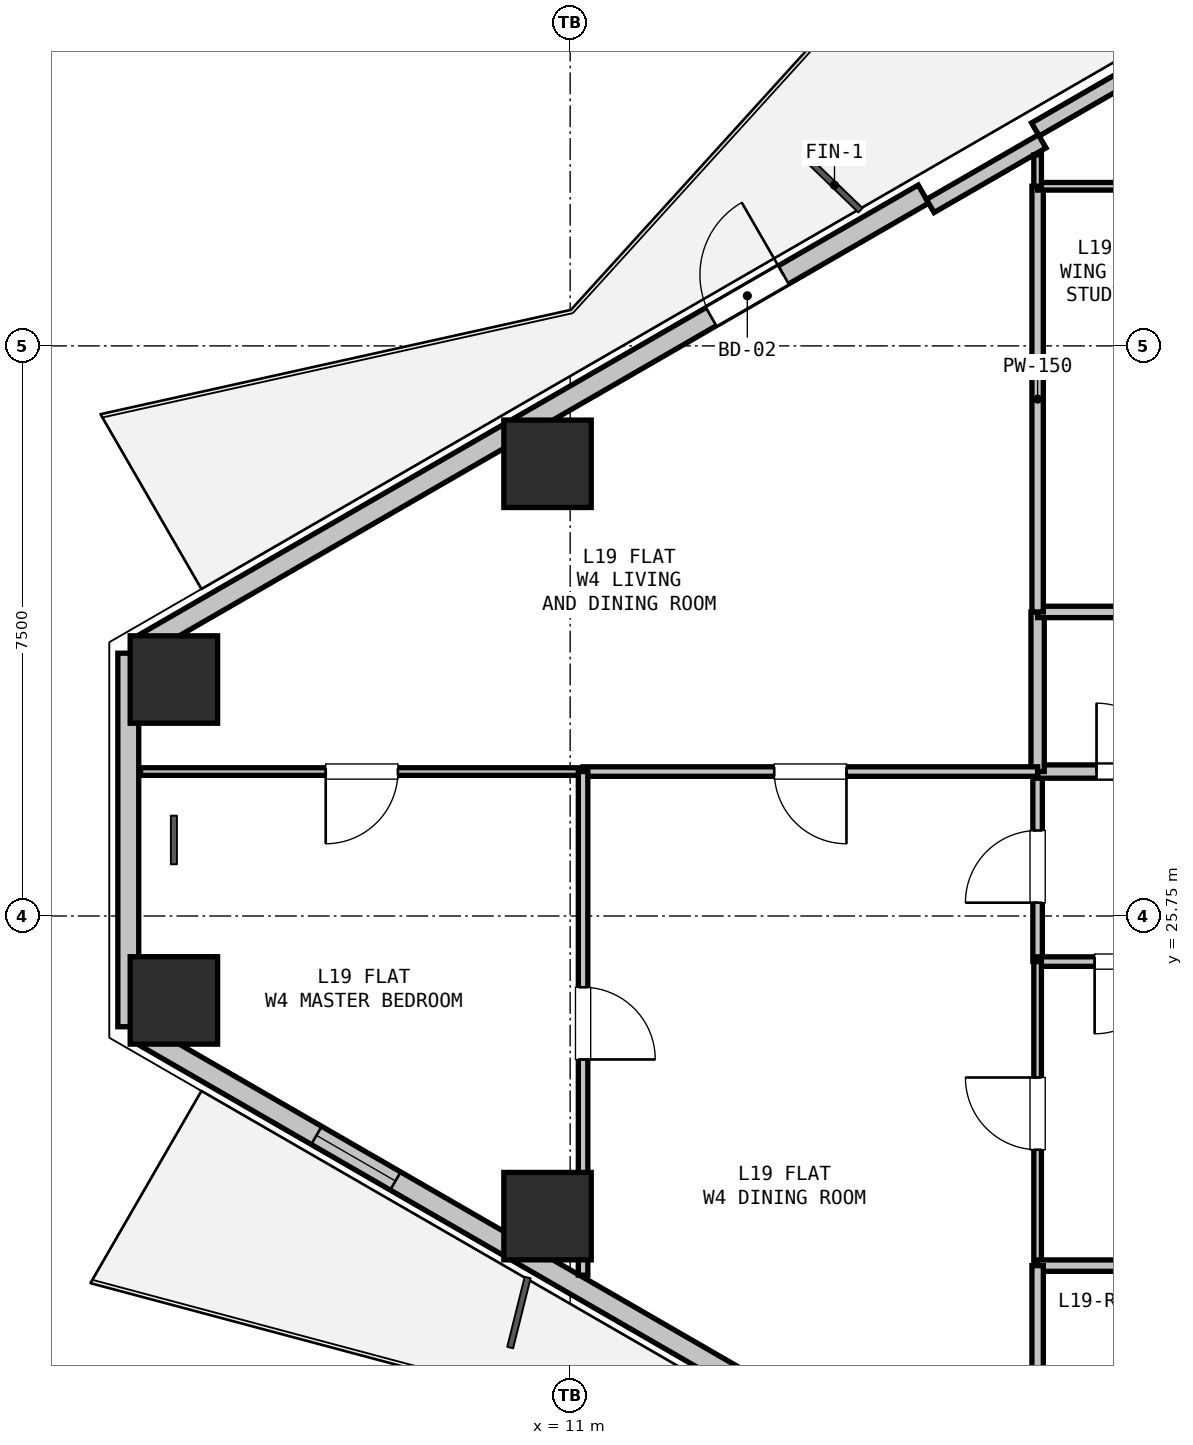
"""IFC4 building model, lengths in metres.
Left out: names, types, materials, properties, quantities, classifications, styles, units other than length and angle.
Written with IfcOpenShell. Run it as: python <this file> out.ifc"""

import sys

from ifc_helpers import new_model, si_unit, direction, frame, frame_2d, origin, origin_2d, place, context, subcontext, project, spatial, rectangle, hollow_rectangle, extrude, element, fill, save


model = new_model("IFC4")
c1 = context("Model", 3, precision=1e-05, world=origin(), true_north=direction((0.0, 1.0)))
c2 = subcontext(c1, "Body", "Model", "MODEL_VIEW")
j1 = project(units=[si_unit("LENGTHUNIT", "METRE"), si_unit("PLANEANGLEUNIT", "RADIAN")], contexts=[c1])
p1 = place(None, origin())
s1 = spatial("IfcSite", under=j1, at=p1, CompositionType="ELEMENT")
p2 = place(p1, origin())
s2 = spatial("IfcBuilding", under=s1, at=p2, CompositionType="ELEMENT")
p3 = place(p2, frame((0.0, 0.0, 73.5)))
s3 = spatial("IfcBuildingStorey", under=s2, at=p3, CompositionType="ELEMENT", Elevation=73.5)
for number, where, z_axis, x_axis in (
    (1, (5.787, 28.861, 0.0), (0.0, 0.0, 1.0), (1.0, 0.0, 0.0)),
    (2, (10.702, 31.699, 0.0), (0.0, 0.0, 1.0), (1.0, 0.0, 0.0)),
    (3, (10.702, 21.801, 0.0), (0.0, 0.0, 1.0), (1.0, 0.0, 0.0)),
    (4, (5.787, 24.639, 0.0), (0.0, 0.0, 1.0), (1.0, 0.0, 0.0)),
):
    element("IfcColumn", number, at=place(p3, frame(where, z_axis=z_axis, x_axis=x_axis)), inside=s3, PredefinedType="COLUMN", context=c2, shape_type="SweptSolid", body=[
        extrude(hollow_rectangle(XDim=1.15, YDim=1.15, WallThickness=0.032, at=origin_2d()), origin(), (0.0, 0.0, 1.0), 3.3),
    ])
p4 = place(p3, frame((5.187, 24.293, 0.0), z_axis=(0.0, 0.0, 1.0), x_axis=(0.0, 1.0, 0.0)))
e5 = element("IfcWall", 5, at=p4, inside=s3, PredefinedType="SOLIDWALL", context=c2, shape_type="SweptSolid", body=[
    extrude(rectangle(XDim=4.915, YDim=0.275, at=frame_2d((2.457, 0.0))), origin(), (0.0, 0.0, 1.0), 2.67),
])
p5 = place(p3, frame((5.317, 29.282, 0.0), z_axis=(0.0, 0.0, 1.0), x_axis=(0.866023023012, 0.500004123596, 0.0)))
e6 = element("IfcWall", 6, at=p5, inside=s3, PredefinedType="SOLIDWALL", context=c2, shape_type="SweptSolid", body=[
    extrude(rectangle(XDim=11.93, YDim=0.275, at=frame_2d((5.965, 0.0))), origin(), (0.0, 0.0, 1.0), 2.67),
])
p6 = place(p5, frame((8.704, 0.0, 0.0)))
e7 = element("IfcOpeningElement", 7, at=p6, cuts=e6, PredefinedType="OPENING", context=c2, shape_type="SweptSolid", body=[
    extrude(rectangle(XDim=1.1, YDim=2.1, at=frame_2d((0.55, 1.05))), frame((0.0, 0.147, 0.0), z_axis=(0.0, -1.0, 0.0), x_axis=(1.0, 0.0, 0.0)), (0.0, 0.0, 1.0), 0.295),
])
p7 = place(p3, frame((17.12, 36.097, 0.0), z_axis=(0.0, 0.0, 1.0), x_axis=(0.866027010039, 0.499997217876, 0.0)))
e8 = element("IfcWall", 8, at=p7, inside=s3, PredefinedType="PARAPET", context=c2, shape_type="SweptSolid", body=[
    extrude(rectangle(XDim=11.229, YDim=0.2, at=frame_2d((5.615, 0.0))), origin(), (0.0, 0.0, 1.0), 0.2),
])
p8 = place(p3, frame((15.738, 35.091, 0.0), z_axis=(0.0, 0.0, 1.0), x_axis=(0.866025371046, 0.500000056704, 0.0)))
e9 = element("IfcWall", 9, at=p8, inside=s3, PredefinedType="PARAPET", context=c2, shape_type="SweptSolid", body=[
    extrude(rectangle(XDim=1.7, YDim=0.2, at=frame_2d((0.85, 0.0))), origin(), (0.0, 0.0, 1.0), 2.67),
])
p9 = place(p3, frame((15.648, 18.253, 0.0), z_axis=(0.0, 0.0, 1.0), x_axis=(-0.866023023012, 0.500004123596, 0.0)))
e10 = element("IfcWall", 10, at=p9, inside=s3, PredefinedType="SOLIDWALL", context=c2, shape_type="SweptSolid", body=[
    extrude(rectangle(XDim=11.93, YDim=0.275, at=frame_2d((5.965, 0.0))), origin(), (0.0, 0.0, 1.0), 2.67),
])
p10 = place(p9, frame((8.021, 0.0, 0.9)))
e11 = element("IfcOpeningElement", 11, at=p10, cuts=e10, PredefinedType="OPENING", context=c2, shape_type="SweptSolid", body=[
    extrude(rectangle(XDim=1.2, YDim=1.4, at=frame_2d((0.6, 0.7))), frame((0.0, 0.147, 0.0), z_axis=(0.0, -1.0, 0.0), x_axis=(1.0, 0.0, 0.0)), (0.0, 0.0, 1.0), 0.295),
])
p11 = place(p3, frame((17.15, 25.15, 0.0), z_axis=(0.0, 0.0, 1.0), x_axis=(0.0, 1.0, 0.0)))
e12 = element("IfcWall", 12, at=p11, inside=s3, PredefinedType="PARTITIONING", context=c2, shape_type="SweptSolid", body=[
    extrude(rectangle(XDim=2.5, YDim=0.125, at=frame_2d((1.25, 0.0))), origin(), (0.0, 0.0, 1.0), 3.05),
])
p12 = place(p11, frame((0.775, 0.0, 0.0)))
e13 = element("IfcOpeningElement", 13, at=p12, cuts=e12, PredefinedType="OPENING", context=c2, shape_type="SweptSolid", body=[
    extrude(rectangle(XDim=0.95, YDim=2.1, at=frame_2d((0.475, 1.05))), frame((0.0, 0.073, 0.0), z_axis=(0.0, -1.0, 0.0), x_axis=(1.0, 0.0, 0.0)), (0.0, 0.0, 1.0), 0.145),
])
p13 = place(p3, frame((17.15, 27.65, 0.0), z_axis=(0.0, 0.0, 1.0), x_axis=(1.0, 0.0, 0.0)))
e14 = element("IfcWall", 14, at=p13, inside=s3, PredefinedType="PLUMBINGWALL", context=c2, shape_type="SweptSolid", body=[
    extrude(rectangle(XDim=2.45, YDim=0.175, at=frame_2d((1.225, 0.0))), origin(), (0.0, 0.0, 1.0), 3.05),
])
p14 = place(p13, frame((0.775, 0.0, 0.0)))
e15 = element("IfcOpeningElement", 15, at=p14, cuts=e14, PredefinedType="OPENING", context=c2, shape_type="SweptSolid", body=[
    extrude(rectangle(XDim=0.9, YDim=2.1, at=frame_2d((0.45, 1.05))), frame((0.0, 0.097, 0.0), z_axis=(0.0, -1.0, 0.0), x_axis=(1.0, 0.0, 0.0)), (0.0, 0.0, 1.0), 0.195),
])
p15 = place(p3, frame((19.6, 25.15, 0.0), z_axis=(0.0, 0.0, 1.0), x_axis=(-1.0, 0.0, 0.0)))
e16 = element("IfcWall", 16, at=p15, inside=s3, PredefinedType="PARTITIONING", context=c2, shape_type="SweptSolid", body=[
    extrude(rectangle(XDim=2.45, YDim=0.125, at=frame_2d((1.225, 0.0))), origin(), (0.0, 0.0, 1.0), 3.05),
])
p16 = place(p15, frame((0.75, 0.0, 0.0)))
e17 = element("IfcOpeningElement", 17, at=p16, cuts=e16, PredefinedType="OPENING", context=c2, shape_type="SweptSolid", body=[
    extrude(rectangle(XDim=0.95, YDim=2.1, at=frame_2d((0.475, 1.05))), frame((0.0, 0.073, 0.0), z_axis=(0.0, -1.0, 0.0), x_axis=(1.0, 0.0, 0.0)), (0.0, 0.0, 1.0), 0.145),
])
p17 = place(p3, frame((17.15, 27.65, 0.0), z_axis=(0.0, 0.0, 1.0), x_axis=(0.0, 1.0, 0.0)))
e18 = element("IfcWall", 18, at=p17, inside=s3, PredefinedType="PLUMBINGWALL", context=c2, shape_type="SweptSolid", body=[
    extrude(rectangle(XDim=2.1, YDim=0.175, at=frame_2d((1.05, 0.0))), origin(), (0.0, 0.0, 1.0), 3.05),
])
p18 = place(p3, frame((17.15, 29.75, 0.0), z_axis=(0.0, 0.0, 1.0), x_axis=(1.0, 0.0, 0.0)))
e19 = element("IfcWall", 19, at=p18, inside=s3, PredefinedType="PARTITIONING", context=c2, shape_type="SweptSolid", body=[
    extrude(rectangle(XDim=2.45, YDim=0.15, at=frame_2d((1.225, 0.0))), origin(), (0.0, 0.0, 1.0), 3.05),
])
p19 = place(p3, frame((17.15, 21.15, 0.0), z_axis=(0.0, 0.0, 1.0), x_axis=(0.0, 1.0, 0.0)))
e20 = element("IfcWall", 20, at=p19, inside=s3, PredefinedType="PARTITIONING", context=c2, shape_type="SweptSolid", body=[
    extrude(rectangle(XDim=4.0, YDim=0.1, at=frame_2d((2.0, 0.0))), origin(), (0.0, 0.0, 1.0), 2.423),
])
p20 = place(p19, frame((1.525, 0.0, 0.0)))
e21 = element("IfcOpeningElement", 21, at=p20, cuts=e20, PredefinedType="OPENING", context=c2, shape_type="SweptSolid", body=[
    extrude(rectangle(XDim=0.95, YDim=2.1, at=frame_2d((0.475, 1.05))), frame((0.0, 0.06, 0.0), z_axis=(0.0, -1.0, 0.0), x_axis=(1.0, 0.0, 0.0)), (0.0, 0.0, 1.0), 0.12),
])
p21 = place(p3, frame((19.6, 21.15, 0.0), z_axis=(0.0, 0.0, 1.0), x_axis=(-1.0, 0.0, 0.0)))
e22 = element("IfcWall", 22, at=p21, inside=s3, PredefinedType="PARTITIONING", context=c2, shape_type="SweptSolid", body=[
    extrude(rectangle(XDim=2.45, YDim=0.15, at=frame_2d((1.225, 0.0))), origin(), (0.0, 0.0, 1.0), 2.423),
])
p22 = place(p3, frame((17.15, 29.75, 0.0), z_axis=(0.0, 0.0, 1.0), x_axis=(0.0, 1.0, 0.0)))
e23 = element("IfcWall", 23, at=p22, inside=s3, PredefinedType="PARTITIONING", context=c2, shape_type="SweptSolid", body=[
    extrude(rectangle(XDim=5.6, YDim=0.15, at=frame_2d((2.8, 0.0))), origin(), (0.0, 0.0, 1.0), 2.365),
])
p23 = place(p3, frame((17.15, 35.35, 0.0), z_axis=(0.0, 0.0, 1.0), x_axis=(1.0, 0.0, 0.0)))
e24 = element("IfcWall", 24, at=p23, inside=s3, PredefinedType="PARTITIONING", context=c2, shape_type="SweptSolid", body=[
    extrude(rectangle(XDim=2.45, YDim=0.1, at=frame_2d((1.225, 0.0))), origin(), (0.0, 0.0, 1.0), 2.365),
])
p24 = place(p3, frame((17.15, 17.737, 0.0), z_axis=(0.0, 0.0, 1.0), x_axis=(0.0, 1.0, 0.0)))
e25 = element("IfcWall", 25, at=p24, inside=s3, PredefinedType="PARTITIONING", context=c2, shape_type="SweptSolid", body=[
    extrude(rectangle(XDim=3.413, YDim=0.15, at=frame_2d((1.707, 0.0))), origin(), (0.0, 0.0, 1.0), 2.365),
])
p25 = place(p3, frame((17.15, 35.763, 0.0), z_axis=(0.0, 0.0, 1.0), x_axis=(0.0, -1.0, 0.0)))
e26 = element("IfcWall", 26, at=p25, inside=s3, PredefinedType="PARTITIONING", context=c2, shape_type="SweptSolid", body=[
    extrude(rectangle(XDim=0.413, YDim=0.1, at=frame_2d((0.207, 0.0))), origin(), (0.0, 0.0, 1.0), 2.365),
])
p26 = place(p3, frame((17.15, 27.65, 0.0), z_axis=(0.0, 0.0, 1.0), x_axis=(-1.0, 0.0, 0.0)))
e27 = element("IfcWall", 27, at=p26, inside=s3, PredefinedType="PARTITIONING", context=c2, shape_type="SweptSolid", body=[
    extrude(rectangle(XDim=5.98, YDim=0.125, at=frame_2d((2.99, 0.0))), origin(), (0.0, 0.0, 1.0), 3.05),
])
p27 = place(p26, frame((2.515, 0.0, 0.0)))
e28 = element("IfcOpeningElement", 28, at=p27, cuts=e27, PredefinedType="OPENING", context=c2, shape_type="SweptSolid", body=[
    extrude(rectangle(XDim=0.95, YDim=2.1, at=frame_2d((0.475, 1.05))), frame((0.0, 0.073, 0.0), z_axis=(0.0, -1.0, 0.0), x_axis=(1.0, 0.0, 0.0)), (0.0, 0.0, 1.0), 0.145),
])
p28 = place(p3, frame((11.17, 27.65, 0.0), z_axis=(0.0, 0.0, 1.0), x_axis=(-1.0, 0.0, 0.0)))
e29 = element("IfcWall", 29, at=p28, inside=s3, PredefinedType="PARTITIONING", context=c2, shape_type="SweptSolid", body=[
    extrude(rectangle(XDim=5.822, YDim=0.1, at=frame_2d((2.911, 0.0))), origin(), (0.0, 0.0, 1.0), 2.66),
])
p29 = place(p28, frame((2.436, 0.0, 0.0)))
e30 = element("IfcOpeningElement", 30, at=p29, cuts=e29, PredefinedType="OPENING", context=c2, shape_type="SweptSolid", body=[
    extrude(rectangle(XDim=0.95, YDim=2.1, at=frame_2d((0.475, 1.05))), frame((0.0, 0.06, 0.0), z_axis=(0.0, -1.0, 0.0), x_axis=(1.0, 0.0, 0.0)), (0.0, 0.0, 1.0), 0.12),
])
p30 = place(p3, frame((11.17, 27.65, 0.0), z_axis=(0.0, 0.0, 1.0), x_axis=(0.0, -1.0, 0.0)))
e31 = element("IfcWall", 31, at=p30, inside=s3, PredefinedType="PARTITIONING", context=c2, shape_type="SweptSolid", body=[
    extrude(rectangle(XDim=6.625, YDim=0.125, at=frame_2d((3.312, 0.0))), origin(), (0.0, 0.0, 1.0), 2.365),
])
p31 = place(p30, frame((2.838, 0.0, 0.0)))
e32 = element("IfcOpeningElement", 32, at=p31, cuts=e31, PredefinedType="OPENING", context=c2, shape_type="SweptSolid", body=[
    extrude(rectangle(XDim=0.95, YDim=2.1, at=frame_2d((0.475, 1.05))), frame((0.0, 0.073, 0.0), z_axis=(0.0, -1.0, 0.0), x_axis=(1.0, 0.0, 0.0)), (0.0, 0.0, 1.0), 0.145),
])
p32 = place(p6, origin())
e33 = element("IfcDoor", 33, at=p32, inside=s3, OperationType="SINGLE_SWING_RIGHT", PredefinedType="DOOR", context=c2, shape_type="SweptSolid", body=[
    extrude(rectangle(XDim=1.1, YDim=2.1, at=frame_2d((0.55, 1.05))), frame((0.0, 0.025, 0.0), z_axis=(0.0, -1.0, 0.0), x_axis=(1.0, 0.0, 0.0)), (0.0, 0.0, 1.0), 0.05),
])
fill(e7, e33)
p33 = place(p10, origin())
e34 = element("IfcWindow", 34, at=p33, inside=s3, PartitioningType="SINGLE_PANEL", PredefinedType="WINDOW", context=c2, shape_type="SweptSolid", body=[
    extrude(rectangle(XDim=1.2, YDim=1.4, at=frame_2d((0.6, 0.7))), frame((0.0, 0.03, 0.0), z_axis=(0.0, -1.0, 0.0), x_axis=(1.0, 0.0, 0.0)), (0.0, 0.0, 1.0), 0.06),
])
fill(e11, e34)
p34 = place(p14, origin())
e35 = element("IfcDoor", 35, at=p34, inside=s3, OperationType="SINGLE_SWING_LEFT", PredefinedType="DOOR", context=c2, shape_type="SweptSolid", body=[
    extrude(rectangle(XDim=0.9, YDim=2.1, at=frame_2d((0.45, 1.05))), frame((0.0, 0.025, 0.0), z_axis=(0.0, -1.0, 0.0), x_axis=(1.0, 0.0, 0.0)), (0.0, 0.0, 1.0), 0.05),
])
fill(e15, e35)
p35 = place(p16, origin())
e36 = element("IfcDoor", 36, at=p35, inside=s3, OperationType="SINGLE_SWING_RIGHT", PredefinedType="DOOR", context=c2, shape_type="SweptSolid", body=[
    extrude(rectangle(XDim=0.95, YDim=2.1, at=frame_2d((0.475, 1.05))), frame((0.0, 0.025, 0.0), z_axis=(0.0, -1.0, 0.0), x_axis=(1.0, 0.0, 0.0)), (0.0, 0.0, 1.0), 0.05),
])
fill(e17, e36)
p36 = place(p12, origin())
e37 = element("IfcDoor", 37, at=p36, inside=s3, OperationType="SINGLE_SWING_LEFT", PredefinedType="DOOR", context=c2, shape_type="SweptSolid", body=[
    extrude(rectangle(XDim=0.95, YDim=2.1, at=frame_2d((0.475, 1.05))), frame((0.0, 0.025, 0.0), z_axis=(0.0, -1.0, 0.0), x_axis=(1.0, 0.0, 0.0)), (0.0, 0.0, 1.0), 0.05),
])
fill(e13, e37)
p37 = place(p20, origin())
e38 = element("IfcDoor", 38, at=p37, inside=s3, OperationType="SINGLE_SWING_RIGHT", PredefinedType="DOOR", context=c2, shape_type="SweptSolid", body=[
    extrude(rectangle(XDim=0.95, YDim=2.1, at=frame_2d((0.475, 1.05))), frame((0.0, 0.025, 0.0), z_axis=(0.0, -1.0, 0.0), x_axis=(1.0, 0.0, 0.0)), (0.0, 0.0, 1.0), 0.05),
])
fill(e21, e38)
p38 = place(p29, origin())
e39 = element("IfcDoor", 39, at=p38, inside=s3, OperationType="SINGLE_SWING_RIGHT", PredefinedType="DOOR", context=c2, shape_type="SweptSolid", body=[
    extrude(rectangle(XDim=0.95, YDim=2.1, at=frame_2d((0.475, 1.05))), frame((0.0, 0.025, 0.0), z_axis=(0.0, -1.0, 0.0), x_axis=(1.0, 0.0, 0.0)), (0.0, 0.0, 1.0), 0.05),
])
fill(e30, e39)
p39 = place(p27, origin())
e40 = element("IfcDoor", 40, at=p39, inside=s3, OperationType="SINGLE_SWING_LEFT", PredefinedType="DOOR", context=c2, shape_type="SweptSolid", body=[
    extrude(rectangle(XDim=0.95, YDim=2.1, at=frame_2d((0.475, 1.05))), frame((0.0, 0.025, 0.0), z_axis=(0.0, -1.0, 0.0), x_axis=(1.0, 0.0, 0.0)), (0.0, 0.0, 1.0), 0.05),
])
fill(e28, e40)
p40 = place(p31, origin())
e41 = element("IfcDoor", 41, at=p40, inside=s3, OperationType="SINGLE_SWING_RIGHT", PredefinedType="DOOR", context=c2, shape_type="SweptSolid", body=[
    extrude(rectangle(XDim=0.95, YDim=2.1, at=frame_2d((0.475, 1.05))), frame((0.0, 0.025, 0.0), z_axis=(0.0, -1.0, 0.0), x_axis=(1.0, 0.0, 0.0)), (0.0, 0.0, 1.0), 0.05),
])
fill(e32, e41)
save(model, sys.argv[1])
